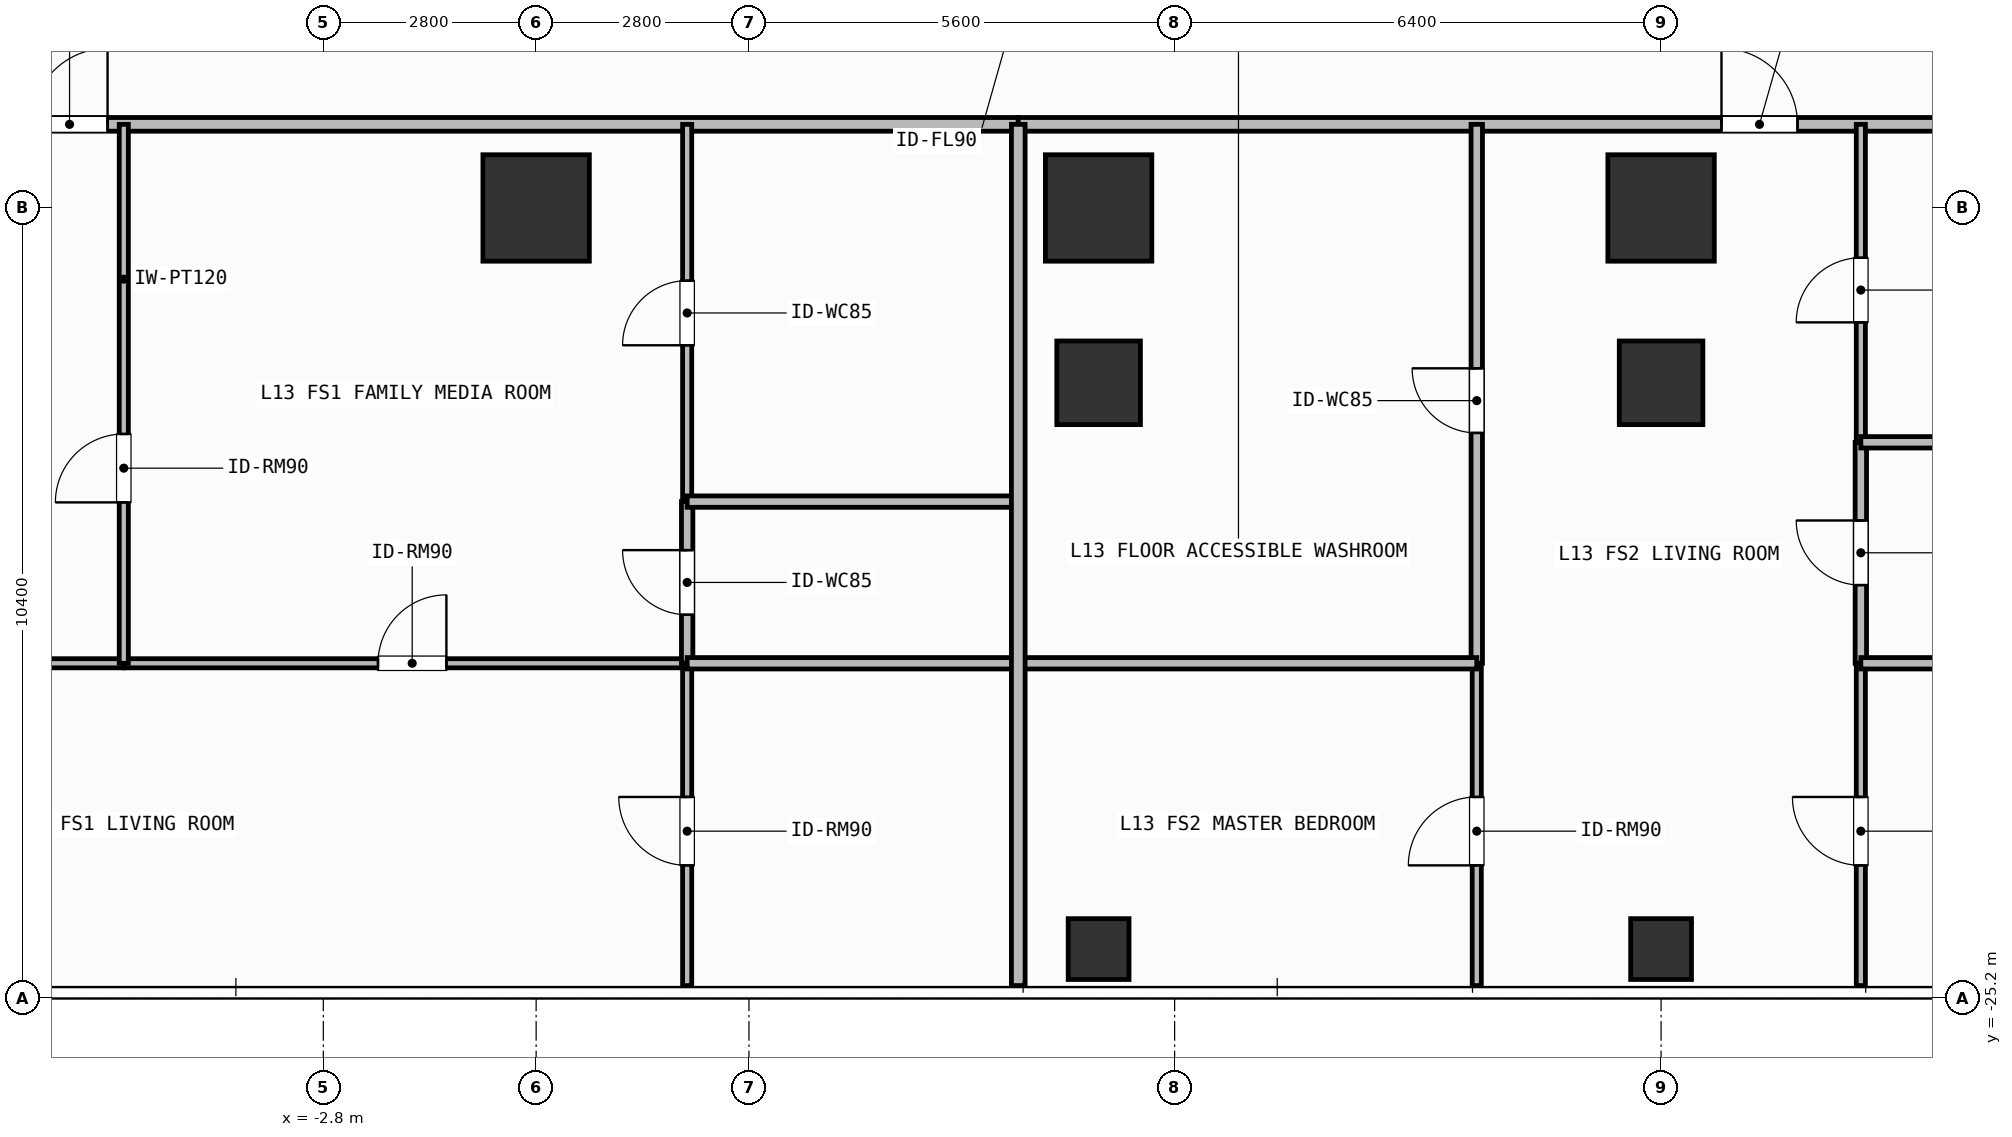
"""IFC4 building model, lengths in metres.
Left out: names, types, materials, properties, quantities, classifications, styles, units other than length and angle.
Written with IfcOpenShell. Run it as: python <this file> out.ifc"""

import sys

from ifc_helpers import new_model, si_unit, direction, frame, frame_2d, origin, origin_2d, place, context, subcontext, project, spatial, rectangle, hollow_rectangle, extrude, element, fill, save


model = new_model("IFC4")
c1 = context("Model", 3, precision=1e-05, world=origin(), true_north=direction((0.0, 1.0)))
c2 = subcontext(c1, "Body", "Model", "MODEL_VIEW")
j1 = project(units=[si_unit("LENGTHUNIT", "METRE"), si_unit("PLANEANGLEUNIT", "RADIAN")], contexts=[c1])
p1 = place(None, origin())
s1 = spatial("IfcSite", under=j1, at=p1, CompositionType="ELEMENT")
p2 = place(p1, origin())
s2 = spatial("IfcBuilding", under=s1, at=p2, CompositionType="ELEMENT")
p3 = place(p2, frame((0.0, 0.0, 50.1)))
s3 = spatial("IfcBuildingStorey", under=s2, at=p3, CompositionType="ELEMENT", Elevation=50.1)
for number, where, z_axis, x_axis in (
    (1, (0.0, -14.8, 0.0), (0.0, 0.0, 1.0), (1.0, 0.0, 0.0)),
    (2, (7.4, -14.8, 0.0), (0.0, 0.0, 1.0), (1.0, 0.0, 0.0)),
    (3, (14.8, -14.8, 0.0), (0.0, 0.0, 1.0), (1.0, 0.0, 0.0)),
):
    element("IfcColumn", number, at=place(p3, frame(where, z_axis=z_axis, x_axis=x_axis)), inside=s3, PredefinedType="COLUMN", context=c2, shape_type="SweptSolid", body=[
        extrude(rectangle(XDim=1.4, YDim=1.4, at=origin_2d()), origin(), (0.0, 0.0, 1.0), 3.9),
    ])
for number, where, z_axis, x_axis in (
    (4, (7.4, -17.1, 0.0), (0.0, 0.0, 1.0), (1.0, 0.0, 0.0)),
    (5, (14.8, -17.1, 0.0), (0.0, 0.0, 1.0), (1.0, 0.0, 0.0)),
):
    element("IfcColumn", number, at=place(p3, frame(where, z_axis=z_axis, x_axis=x_axis)), inside=s3, PredefinedType="COLUMN", context=c2, shape_type="SweptSolid", body=[
        extrude(rectangle(XDim=1.1, YDim=1.1, at=origin_2d()), origin(), (0.0, 0.0, 1.0), 3.9),
    ])
for number, where, z_axis, x_axis in (
    (6, (7.4, -24.55, 0.0), (0.0, 0.0, 1.0), (1.0, 0.0, 0.0)),
    (7, (14.8, -24.55, 0.0), (0.0, 0.0, 1.0), (1.0, 0.0, 0.0)),
):
    element("IfcColumn", number, at=place(p3, frame(where, z_axis=z_axis, x_axis=x_axis)), inside=s3, PredefinedType="COLUMN", context=c2, shape_type="SweptSolid", body=[
        extrude(hollow_rectangle(XDim=0.8, YDim=0.8, WallThickness=0.036, at=origin_2d()), origin(), (0.0, 0.0, 1.0), 3.9),
    ])
p4 = place(p3, frame((-18.62, -13.7, 0.0), z_axis=(0.0, 0.0, 1.0), x_axis=(1.0, 0.0, 0.0)))
e8 = element("IfcWall", 8, at=p4, inside=s3, PredefinedType="PARTITIONING", context=c2, shape_type="SweptSolid", body=[
    extrude(rectangle(XDim=24.963, YDim=0.18, at=frame_2d((12.481, 0.0))), origin(), (0.0, 0.0, 1.0), 3.62),
])
p5 = place(p4, frame((11.981, 0.0, 0.0)))
e9 = element("IfcOpeningElement", 9, at=p5, cuts=e8, PredefinedType="OPENING", context=c2, shape_type="SweptSolid", body=[
    extrude(rectangle(XDim=1.0, YDim=2.2, at=frame_2d((0.5, 1.1))), frame((0.0, 0.1, 0.0), z_axis=(0.0, -1.0, 0.0), x_axis=(1.0, 0.0, 0.0)), (0.0, 0.0, 1.0), 0.2),
])
p6 = place(p3, frame((-12.837, -20.79, 0.0), z_axis=(0.0, 0.0, 1.0), x_axis=(1.0, 0.0, 0.0)))
e10 = element("IfcWall", 10, at=p6, inside=s3, PredefinedType="PARTITIONING", context=c2, shape_type="SweptSolid", body=[
    extrude(rectangle(XDim=7.412, YDim=0.12, at=frame_2d((3.706, 0.0))), origin(), (0.0, 0.0, 1.0), 3.62),
])
p7 = place(p6, frame((3.344, 0.0, 0.0)))
e11 = element("IfcOpeningElement", 11, at=p7, cuts=e10, PredefinedType="OPENING", context=c2, shape_type="SweptSolid", body=[
    extrude(rectangle(XDim=0.9, YDim=2.1, at=frame_2d((0.45, 1.05))), frame((0.0, 0.07, 0.0), z_axis=(0.0, -1.0, 0.0), x_axis=(1.0, 0.0, 0.0)), (0.0, 0.0, 1.0), 0.14),
])
p8 = place(p3, frame((-5.425, -20.79, 0.0), z_axis=(0.0, 0.0, 1.0), x_axis=(1.0, 0.0, 0.0)))
e12 = element("IfcWall", 12, at=p8, inside=s3, PredefinedType="PARTITIONING", context=c2, shape_type="SweptSolid", body=[
    extrude(rectangle(XDim=7.412, YDim=0.12, at=frame_2d((3.706, 0.0))), origin(), (0.0, 0.0, 1.0), 3.62),
])
p9 = place(p8, frame((3.344, 0.0, 0.0)))
e13 = element("IfcOpeningElement", 13, at=p9, cuts=e12, PredefinedType="OPENING", context=c2, shape_type="SweptSolid", body=[
    extrude(rectangle(XDim=0.9, YDim=2.1, at=frame_2d((0.45, 1.05))), frame((0.0, 0.07, 0.0), z_axis=(0.0, -1.0, 0.0), x_axis=(1.0, 0.0, 0.0)), (0.0, 0.0, 1.0), 0.14),
])
p10 = place(p3, frame((-5.425, -20.79, 0.0), z_axis=(0.0, 0.0, 1.0), x_axis=(0.0, 1.0, 0.0)))
e14 = element("IfcWall", 14, at=p10, inside=s3, PredefinedType="PARTITIONING", context=c2, shape_type="SweptSolid", body=[
    extrude(rectangle(XDim=7.09, YDim=0.12, at=frame_2d((3.545, 0.0))), origin(), (0.0, 0.0, 1.0), 3.62),
])
p11 = place(p10, frame((2.117, 0.0, 0.0)))
e15 = element("IfcOpeningElement", 15, at=p11, cuts=e14, PredefinedType="OPENING", context=c2, shape_type="SweptSolid", body=[
    extrude(rectangle(XDim=0.9, YDim=2.1, at=frame_2d((0.45, 1.05))), frame((0.0, 0.07, 0.0), z_axis=(0.0, -1.0, 0.0), x_axis=(1.0, 0.0, 0.0)), (0.0, 0.0, 1.0), 0.14),
])
p12 = place(p3, frame((1.987, -20.79, 0.0), z_axis=(0.0, 0.0, 1.0), x_axis=(0.0, 1.0, 0.0)))
e16 = element("IfcWall", 16, at=p12, inside=s3, PredefinedType="PARTITIONING", context=c2, shape_type="SweptSolid", body=[
    extrude(rectangle(XDim=2.127, YDim=0.15, at=frame_2d((1.063, 0.0))), origin(), (0.0, 0.0, 1.0), 3.62),
])
p13 = place(p12, frame((0.638, 0.0, 0.0)))
e17 = element("IfcOpeningElement", 17, at=p13, cuts=e16, PredefinedType="OPENING", context=c2, shape_type="SweptSolid", body=[
    extrude(rectangle(XDim=0.85, YDim=2.1, at=frame_2d((0.425, 1.05))), frame((0.0, 0.085, 0.0), z_axis=(0.0, -1.0, 0.0), x_axis=(1.0, 0.0, 0.0)), (0.0, 0.0, 1.0), 0.17),
])
p14 = place(p3, frame((1.987, -18.663, 0.0), z_axis=(0.0, 0.0, 1.0), x_axis=(0.0, 1.0, 0.0)))
e18 = element("IfcWall", 18, at=p14, inside=s3, PredefinedType="PARTITIONING", context=c2, shape_type="SweptSolid", body=[
    extrude(rectangle(XDim=4.963, YDim=0.12, at=frame_2d((2.481, 0.0))), origin(), (0.0, 0.0, 1.0), 3.62),
])
p15 = place(p14, frame((2.056, 0.0, 0.0)))
e19 = element("IfcOpeningElement", 19, at=p15, cuts=e18, PredefinedType="OPENING", context=c2, shape_type="SweptSolid", body=[
    extrude(rectangle(XDim=0.85, YDim=2.1, at=frame_2d((0.425, 1.05))), frame((0.0, 0.07, 0.0), z_axis=(0.0, -1.0, 0.0), x_axis=(1.0, 0.0, 0.0)), (0.0, 0.0, 1.0), 0.14),
])
p16 = place(p3, frame((1.987, -25.03, 0.0), z_axis=(0.0, 0.0, 1.0), x_axis=(0.0, 1.0, 0.0)))
e20 = element("IfcWall", 20, at=p16, inside=s3, PredefinedType="PARTITIONING", context=c2, shape_type="SweptSolid", body=[
    extrude(rectangle(XDim=4.24, YDim=0.12, at=frame_2d((2.12, 0.0))), origin(), (0.0, 0.0, 1.0), 3.62),
])
p17 = place(p16, frame((1.581, 0.0, 0.0)))
e21 = element("IfcOpeningElement", 21, at=p17, cuts=e20, PredefinedType="OPENING", context=c2, shape_type="SweptSolid", body=[
    extrude(rectangle(XDim=0.9, YDim=2.1, at=frame_2d((0.45, 1.05))), frame((0.0, 0.07, 0.0), z_axis=(0.0, -1.0, 0.0), x_axis=(1.0, 0.0, 0.0)), (0.0, 0.0, 1.0), 0.14),
])
p18 = place(p3, frame((6.343, -13.7, 0.0), z_axis=(0.0, 0.0, 1.0), x_axis=(1.0, 0.0, 0.0)))
e22 = element("IfcWall", 22, at=p18, inside=s3, PredefinedType="PARTITIONING", context=c2, shape_type="SweptSolid", body=[
    extrude(rectangle(XDim=18.077, YDim=0.18, at=frame_2d((9.039, 0.0))), origin(), (0.0, 0.0, 1.0), 3.62),
])
p19 = place(p18, frame((9.252, 0.0, 0.0)))
e23 = element("IfcOpeningElement", 23, at=p19, cuts=e22, PredefinedType="OPENING", context=c2, shape_type="SweptSolid", body=[
    extrude(rectangle(XDim=1.0, YDim=2.2, at=frame_2d((0.5, 1.1))), frame((0.0, 0.1, 0.0), z_axis=(0.0, -1.0, 0.0), x_axis=(1.0, 0.0, 0.0)), (0.0, 0.0, 1.0), 0.2),
])
p20 = place(p3, frame((12.375, -20.79, 0.0), z_axis=(0.0, 0.0, 1.0), x_axis=(0.0, 1.0, 0.0)))
e24 = element("IfcWall", 24, at=p20, inside=s3, PredefinedType="PARTITIONING", context=c2, shape_type="SweptSolid", body=[
    extrude(rectangle(XDim=7.09, YDim=0.15, at=frame_2d((3.545, 0.0))), origin(), (0.0, 0.0, 1.0), 3.62),
])
p21 = place(p20, frame((3.03, 0.0, 0.0)))
e25 = element("IfcOpeningElement", 25, at=p21, cuts=e24, PredefinedType="OPENING", context=c2, shape_type="SweptSolid", body=[
    extrude(rectangle(XDim=0.85, YDim=2.1, at=frame_2d((0.425, 1.05))), frame((0.0, 0.085, 0.0), z_axis=(0.0, -1.0, 0.0), x_axis=(1.0, 0.0, 0.0)), (0.0, 0.0, 1.0), 0.17),
])
p22 = place(p3, frame((12.375, -25.03, 0.0), z_axis=(0.0, 0.0, 1.0), x_axis=(0.0, 1.0, 0.0)))
e26 = element("IfcWall", 26, at=p22, inside=s3, PredefinedType="PARTITIONING", context=c2, shape_type="SweptSolid", body=[
    extrude(rectangle(XDim=4.24, YDim=0.12, at=frame_2d((2.12, 0.0))), origin(), (0.0, 0.0, 1.0), 3.62),
])
p23 = place(p22, frame((1.581, 0.0, 0.0)))
e27 = element("IfcOpeningElement", 27, at=p23, cuts=e26, PredefinedType="OPENING", context=c2, shape_type="SweptSolid", body=[
    extrude(rectangle(XDim=0.9, YDim=2.1, at=frame_2d((0.45, 1.05))), frame((0.0, 0.07, 0.0), z_axis=(0.0, -1.0, 0.0), x_axis=(1.0, 0.0, 0.0)), (0.0, 0.0, 1.0), 0.14),
])
p24 = place(p3, frame((17.428, -20.79, 0.0), z_axis=(0.0, 0.0, 1.0), x_axis=(0.0, 1.0, 0.0)))
e28 = element("IfcWall", 28, at=p24, inside=s3, PredefinedType="PARTITIONING", context=c2, shape_type="SweptSolid", body=[
    extrude(rectangle(XDim=2.907, YDim=0.15, at=frame_2d((1.454, 0.0))), origin(), (0.0, 0.0, 1.0), 3.62),
])
p25 = place(p24, frame((1.029, 0.0, 0.0)))
e29 = element("IfcOpeningElement", 29, at=p25, cuts=e28, PredefinedType="OPENING", context=c2, shape_type="SweptSolid", body=[
    extrude(rectangle(XDim=0.85, YDim=2.1, at=frame_2d((0.425, 1.05))), frame((0.0, 0.085, 0.0), z_axis=(0.0, -1.0, 0.0), x_axis=(1.0, 0.0, 0.0)), (0.0, 0.0, 1.0), 0.17),
])
p26 = place(p3, frame((17.428, -17.883, 0.0), z_axis=(0.0, 0.0, 1.0), x_axis=(0.0, 1.0, 0.0)))
e30 = element("IfcWall", 30, at=p26, inside=s3, PredefinedType="PARTITIONING", context=c2, shape_type="SweptSolid", body=[
    extrude(rectangle(XDim=4.183, YDim=0.12, at=frame_2d((2.092, 0.0))), origin(), (0.0, 0.0, 1.0), 3.62),
])
p27 = place(p26, frame((1.578, 0.0, 0.0)))
e31 = element("IfcOpeningElement", 31, at=p27, cuts=e30, PredefinedType="OPENING", context=c2, shape_type="SweptSolid", body=[
    extrude(rectangle(XDim=0.85, YDim=2.1, at=frame_2d((0.425, 1.05))), frame((0.0, 0.07, 0.0), z_axis=(0.0, -1.0, 0.0), x_axis=(1.0, 0.0, 0.0)), (0.0, 0.0, 1.0), 0.14),
])
p28 = place(p3, frame((17.428, -25.03, 0.0), z_axis=(0.0, 0.0, 1.0), x_axis=(0.0, 1.0, 0.0)))
e32 = element("IfcWall", 32, at=p28, inside=s3, PredefinedType="PARTITIONING", context=c2, shape_type="SweptSolid", body=[
    extrude(rectangle(XDim=4.24, YDim=0.12, at=frame_2d((2.12, 0.0))), origin(), (0.0, 0.0, 1.0), 3.62),
])
p29 = place(p28, frame((1.581, 0.0, 0.0)))
e33 = element("IfcOpeningElement", 33, at=p29, cuts=e32, PredefinedType="OPENING", context=c2, shape_type="SweptSolid", body=[
    extrude(rectangle(XDim=0.9, YDim=2.1, at=frame_2d((0.45, 1.05))), frame((0.0, 0.07, 0.0), z_axis=(0.0, -1.0, 0.0), x_axis=(1.0, 0.0, 0.0)), (0.0, 0.0, 1.0), 0.14),
])
for number, where, z_axis, x_axis in (
    (34, (1.987, -18.663, 0.0), (0.0, 0.0, 1.0), (1.0, 0.0, 0.0)),
    (35, (1.987, -20.79, 0.0), (0.0, 0.0, 1.0), (1.0, 0.0, 0.0)),
):
    element("IfcWall", number, at=place(p3, frame(where, z_axis=z_axis, x_axis=x_axis)), inside=s3, PredefinedType="PARTITIONING", context=c2, shape_type="SweptSolid", body=[
        extrude(rectangle(XDim=4.356, YDim=0.15, at=frame_2d((2.178, 0.0))), origin(), (0.0, 0.0, 1.0), 3.62),
    ])
p30 = place(p3, frame((6.343, -20.79, 0.0), z_axis=(0.0, 0.0, 1.0), x_axis=(1.0, 0.0, 0.0)))
e36 = element("IfcWall", 36, at=p30, inside=s3, PredefinedType="PARTITIONING", context=c2, shape_type="SweptSolid", body=[
    extrude(rectangle(XDim=6.032, YDim=0.15, at=frame_2d((3.016, 0.0))), origin(), (0.0, 0.0, 1.0), 3.62),
])
for number, where, z_axis, x_axis in (
    (37, (17.428, -17.883, 0.0), (0.0, 0.0, 1.0), (1.0, 0.0, 0.0)),
    (38, (17.428, -20.79, 0.0), (0.0, 0.0, 1.0), (1.0, 0.0, 0.0)),
):
    element("IfcWall", number, at=place(p3, frame(where, z_axis=z_axis, x_axis=x_axis)), inside=s3, PredefinedType="PARTITIONING", context=c2, shape_type="SweptSolid", body=[
        extrude(rectangle(XDim=6.992, YDim=0.15, at=frame_2d((3.496, 0.0))), origin(), (0.0, 0.0, 1.0), 3.62),
    ])
p31 = place(p3, frame((6.343, -25.03, 0.0), z_axis=(0.0, 0.0, 1.0), x_axis=(0.0, 1.0, 0.0)))
e39 = element("IfcWall", 39, at=p31, inside=s3, PredefinedType="PARTITIONING", context=c2, shape_type="SweptSolid", body=[
    extrude(rectangle(XDim=11.33, YDim=0.18, at=frame_2d((5.665, 0.0))), origin(), (0.0, 0.0, 1.0), 3.62),
])
p32 = place(p5, origin())
e40 = element("IfcDoor", 40, at=p32, inside=s3, OperationType="SINGLE_SWING_RIGHT", PredefinedType="DOOR", context=c2, shape_type="SweptSolid", body=[
    extrude(rectangle(XDim=1.0, YDim=2.2, at=frame_2d((0.5, 1.1))), frame((0.0, 0.025, 0.0), z_axis=(0.0, -1.0, 0.0), x_axis=(1.0, 0.0, 0.0)), (0.0, 0.0, 1.0), 0.05),
])
fill(e9, e40)
p33 = place(p9, origin())
e41 = element("IfcDoor", 41, at=p33, inside=s3, OperationType="SINGLE_SWING_RIGHT", PredefinedType="DOOR", context=c2, shape_type="SweptSolid", body=[
    extrude(rectangle(XDim=0.9, YDim=2.1, at=frame_2d((0.45, 1.05))), frame((0.0, 0.025, 0.0), z_axis=(0.0, -1.0, 0.0), x_axis=(1.0, 0.0, 0.0)), (0.0, 0.0, 1.0), 0.05),
])
fill(e13, e41)
p34 = place(p11, origin())
e42 = element("IfcDoor", 42, at=p34, inside=s3, OperationType="SINGLE_SWING_LEFT", PredefinedType="DOOR", context=c2, shape_type="SweptSolid", body=[
    extrude(rectangle(XDim=0.9, YDim=2.1, at=frame_2d((0.45, 1.05))), frame((0.0, 0.025, 0.0), z_axis=(0.0, -1.0, 0.0), x_axis=(1.0, 0.0, 0.0)), (0.0, 0.0, 1.0), 0.05),
])
fill(e15, e42)
p35 = place(p13, origin())
e43 = element("IfcDoor", 43, at=p35, inside=s3, OperationType="SINGLE_SWING_RIGHT", PredefinedType="DOOR", context=c2, shape_type="SweptSolid", body=[
    extrude(rectangle(XDim=0.85, YDim=2.1, at=frame_2d((0.425, 1.05))), frame((0.0, 0.025, 0.0), z_axis=(0.0, -1.0, 0.0), x_axis=(1.0, 0.0, 0.0)), (0.0, 0.0, 1.0), 0.05),
])
fill(e17, e43)
p36 = place(p15, origin())
e44 = element("IfcDoor", 44, at=p36, inside=s3, OperationType="SINGLE_SWING_LEFT", PredefinedType="DOOR", context=c2, shape_type="SweptSolid", body=[
    extrude(rectangle(XDim=0.85, YDim=2.1, at=frame_2d((0.425, 1.05))), frame((0.0, 0.025, 0.0), z_axis=(0.0, -1.0, 0.0), x_axis=(1.0, 0.0, 0.0)), (0.0, 0.0, 1.0), 0.05),
])
fill(e19, e44)
p37 = place(p17, origin())
e45 = element("IfcDoor", 45, at=p37, inside=s3, OperationType="SINGLE_SWING_RIGHT", PredefinedType="DOOR", context=c2, shape_type="SweptSolid", body=[
    extrude(rectangle(XDim=0.9, YDim=2.1, at=frame_2d((0.45, 1.05))), frame((0.0, 0.025, 0.0), z_axis=(0.0, -1.0, 0.0), x_axis=(1.0, 0.0, 0.0)), (0.0, 0.0, 1.0), 0.05),
])
fill(e21, e45)
p38 = place(p19, origin())
e46 = element("IfcDoor", 46, at=p38, inside=s3, OperationType="SINGLE_SWING_LEFT", PredefinedType="DOOR", context=c2, shape_type="SweptSolid", body=[
    extrude(rectangle(XDim=1.0, YDim=2.2, at=frame_2d((0.5, 1.1))), frame((0.0, 0.025, 0.0), z_axis=(0.0, -1.0, 0.0), x_axis=(1.0, 0.0, 0.0)), (0.0, 0.0, 1.0), 0.05),
])
fill(e23, e46)
p39 = place(p21, origin())
e47 = element("IfcDoor", 47, at=p39, inside=s3, OperationType="SINGLE_SWING_RIGHT", PredefinedType="DOOR", context=c2, shape_type="SweptSolid", body=[
    extrude(rectangle(XDim=0.85, YDim=2.1, at=frame_2d((0.425, 1.05))), frame((0.0, 0.025, 0.0), z_axis=(0.0, -1.0, 0.0), x_axis=(1.0, 0.0, 0.0)), (0.0, 0.0, 1.0), 0.05),
])
fill(e25, e47)
p40 = place(p23, origin())
e48 = element("IfcDoor", 48, at=p40, inside=s3, OperationType="SINGLE_SWING_LEFT", PredefinedType="DOOR", context=c2, shape_type="SweptSolid", body=[
    extrude(rectangle(XDim=0.9, YDim=2.1, at=frame_2d((0.45, 1.05))), frame((0.0, 0.025, 0.0), z_axis=(0.0, -1.0, 0.0), x_axis=(1.0, 0.0, 0.0)), (0.0, 0.0, 1.0), 0.05),
])
fill(e27, e48)
p41 = place(p25, origin())
e49 = element("IfcDoor", 49, at=p41, inside=s3, OperationType="SINGLE_SWING_RIGHT", PredefinedType="DOOR", context=c2, shape_type="SweptSolid", body=[
    extrude(rectangle(XDim=0.85, YDim=2.1, at=frame_2d((0.425, 1.05))), frame((0.0, 0.025, 0.0), z_axis=(0.0, -1.0, 0.0), x_axis=(1.0, 0.0, 0.0)), (0.0, 0.0, 1.0), 0.05),
])
fill(e29, e49)
p42 = place(p27, origin())
e50 = element("IfcDoor", 50, at=p42, inside=s3, OperationType="SINGLE_SWING_LEFT", PredefinedType="DOOR", context=c2, shape_type="SweptSolid", body=[
    extrude(rectangle(XDim=0.85, YDim=2.1, at=frame_2d((0.425, 1.05))), frame((0.0, 0.025, 0.0), z_axis=(0.0, -1.0, 0.0), x_axis=(1.0, 0.0, 0.0)), (0.0, 0.0, 1.0), 0.05),
])
fill(e31, e50)
p43 = place(p29, origin())
e51 = element("IfcDoor", 51, at=p43, inside=s3, OperationType="SINGLE_SWING_RIGHT", PredefinedType="DOOR", context=c2, shape_type="SweptSolid", body=[
    extrude(rectangle(XDim=0.9, YDim=2.1, at=frame_2d((0.45, 1.05))), frame((0.0, 0.025, 0.0), z_axis=(0.0, -1.0, 0.0), x_axis=(1.0, 0.0, 0.0)), (0.0, 0.0, 1.0), 0.05),
])
fill(e33, e51)
save(model, sys.argv[1])
